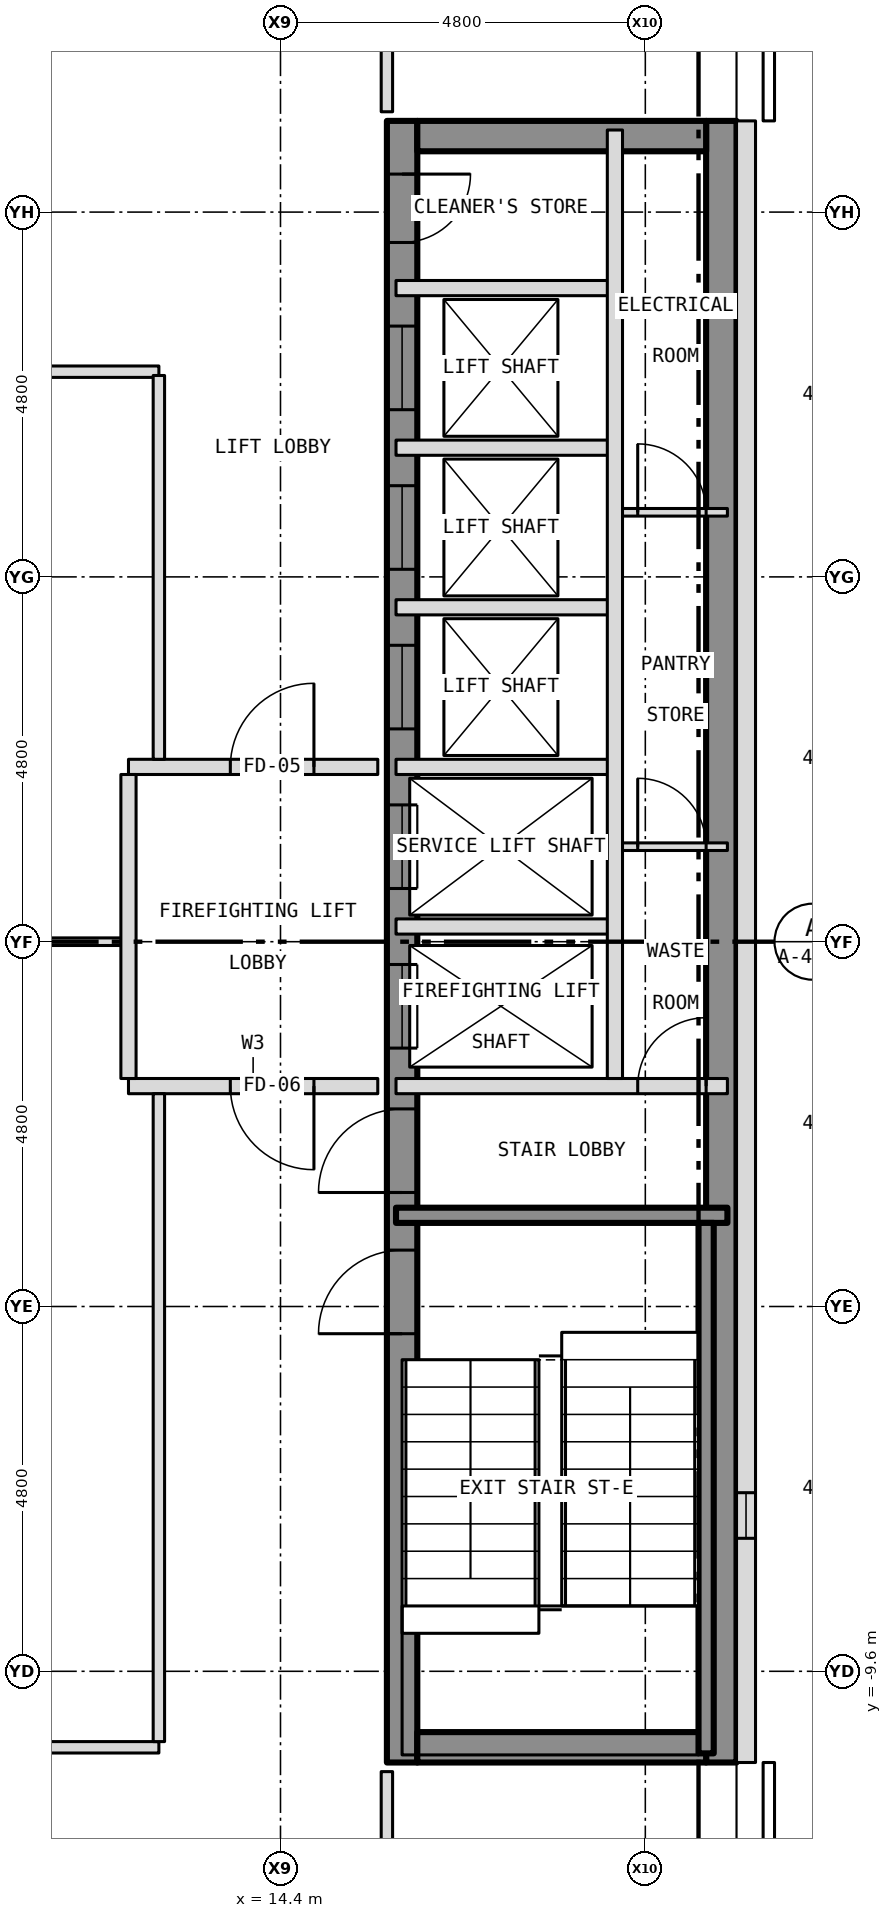
"""IFC4 building model, lengths in metres.
Left out: names, types, materials, properties, quantities, classifications, styles, units other than length and angle.
Written with IfcOpenShell. Run it as: python <this file> out.ifc"""

import sys

from ifc_helpers import new_model, si_unit, direction, frame, frame_2d, origin, place, context, subcontext, project, spatial, rectangle, extrude, element, fill, save


model = new_model("IFC4")
c1 = context("Model", 3, precision=1e-05, world=origin(), true_north=direction((0.0, 1.0)))
c2 = subcontext(c1, "Body", "Model", "MODEL_VIEW")
j1 = project(units=[si_unit("LENGTHUNIT", "METRE"), si_unit("PLANEANGLEUNIT", "RADIAN")], contexts=[c1])
p1 = place(None, origin())
s1 = spatial("IfcSite", under=j1, at=p1, CompositionType="ELEMENT")
p2 = place(p1, origin())
s2 = spatial("IfcBuilding", under=s1, at=p2, CompositionType="ELEMENT")
p3 = place(p2, frame((0.0, 0.0, 201.5)))
s3 = spatial("IfcBuildingStorey", under=s2, at=p3, CompositionType="ELEMENT", Elevation=201.5)
p4 = place(p3, frame((16.0, -10.8, 0.0), z_axis=(0.0, 0.0, 1.0), x_axis=(0.0, 1.0, 0.0)))
e1 = element("IfcWall", 1, at=p4, inside=s3, PredefinedType="SHEAR", context=c2, shape_type="SweptSolid", body=[
    extrude(rectangle(XDim=21.6, YDim=0.4, at=frame_2d((10.8, 0.0))), origin(), (0.0, 0.0, 1.0), 3.25),
])
p5 = place(p4, frame((9.4, 0.0, 0.0)))
e2 = element("IfcOpeningElement", 2, at=p5, cuts=e1, PredefinedType="OPENING", context=c2, shape_type="SweptSolid", body=[
    extrude(rectangle(XDim=1.1, YDim=2.1, at=frame_2d((0.55, 1.05))), frame((0.0, 0.212, 0.0), z_axis=(0.0, -1.0, 0.0), x_axis=(1.0, 0.0, 0.0)), (0.0, 0.0, 1.0), 0.424),
])
p6 = place(p4, frame((11.5, 0.0, 0.0)))
e3 = element("IfcOpeningElement", 3, at=p6, cuts=e1, PredefinedType="OPENING", context=c2, shape_type="SweptSolid", body=[
    extrude(rectangle(XDim=1.1, YDim=2.1, at=frame_2d((0.55, 1.05))), frame((0.0, 0.212, 0.0), z_axis=(0.0, -1.0, 0.0), x_axis=(1.0, 0.0, 0.0)), (0.0, 0.0, 1.0), 0.424),
])
p7 = place(p4, frame((13.6, 0.0, 0.0)))
e4 = element("IfcOpeningElement", 4, at=p7, cuts=e1, PredefinedType="OPENING", context=c2, shape_type="SweptSolid", body=[
    extrude(rectangle(XDim=1.1, YDim=2.1, at=frame_2d((0.55, 1.05))), frame((0.0, 0.212, 0.0), z_axis=(0.0, -1.0, 0.0), x_axis=(1.0, 0.0, 0.0)), (0.0, 0.0, 1.0), 0.424),
])
p8 = place(p4, frame((15.7, 0.0, 0.0)))
e5 = element("IfcOpeningElement", 5, at=p8, cuts=e1, PredefinedType="OPENING", context=c2, shape_type="SweptSolid", body=[
    extrude(rectangle(XDim=1.1, YDim=2.1, at=frame_2d((0.55, 1.05))), frame((0.0, 0.212, 0.0), z_axis=(0.0, -1.0, 0.0), x_axis=(1.0, 0.0, 0.0)), (0.0, 0.0, 1.0), 0.424),
])
p9 = place(p4, frame((17.8, 0.0, 0.0)))
e6 = element("IfcOpeningElement", 6, at=p9, cuts=e1, PredefinedType="OPENING", context=c2, shape_type="SweptSolid", body=[
    extrude(rectangle(XDim=1.1, YDim=2.1, at=frame_2d((0.55, 1.05))), frame((0.0, 0.212, 0.0), z_axis=(0.0, -1.0, 0.0), x_axis=(1.0, 0.0, 0.0)), (0.0, 0.0, 1.0), 0.424),
])
p10 = place(p4, frame((5.642, 0.0, 0.0)))
e7 = element("IfcOpeningElement", 7, at=p10, cuts=e1, PredefinedType="OPENING", context=c2, shape_type="SweptSolid", body=[
    extrude(rectangle(XDim=1.1, YDim=2.1, at=frame_2d((0.55, 1.05))), frame((0.0, 0.212, 0.0), z_axis=(0.0, -1.0, 0.0), x_axis=(1.0, 0.0, 0.0)), (0.0, 0.0, 1.0), 0.424),
])
p11 = place(p4, frame((7.5, 0.0, 0.0)))
e8 = element("IfcOpeningElement", 8, at=p11, cuts=e1, PredefinedType="OPENING", context=c2, shape_type="SweptSolid", body=[
    extrude(rectangle(XDim=1.1, YDim=2.1, at=frame_2d((0.55, 1.05))), frame((0.0, 0.212, 0.0), z_axis=(0.0, -1.0, 0.0), x_axis=(1.0, 0.0, 0.0)), (0.0, 0.0, 1.0), 0.424),
])
p12 = place(p4, frame((20.0, 0.0, 0.0)))
e9 = element("IfcOpeningElement", 9, at=p12, cuts=e1, PredefinedType="OPENING", context=c2, shape_type="SweptSolid", body=[
    extrude(rectangle(XDim=0.9, YDim=2.1, at=frame_2d((0.45, 1.05))), frame((0.0, 0.212, 0.0), z_axis=(0.0, -1.0, 0.0), x_axis=(1.0, 0.0, 0.0)), (0.0, 0.0, 1.0), 0.424),
])
p13 = place(p3, frame((20.2, -10.8, 0.0), z_axis=(0.0, 0.0, 1.0), x_axis=(0.0, 1.0, 0.0)))
e10 = element("IfcWall", 10, at=p13, inside=s3, PredefinedType="SHEAR", context=c2, shape_type="SweptSolid", body=[
    extrude(rectangle(XDim=21.6, YDim=0.4, at=frame_2d((10.8, 0.0))), origin(), (0.0, 0.0, 1.0), 3.25),
])
for number, where, z_axis, x_axis in (
    (11, (16.2, 10.6, 0.0), (0.0, 0.0, 1.0), (1.0, 0.0, 0.0)),
    (12, (16.2, -10.6, 0.0), (0.0, 0.0, 1.0), (1.0, 0.0, 0.0)),
):
    element("IfcWall", number, at=place(p3, frame(where, z_axis=z_axis, x_axis=x_axis)), inside=s3, PredefinedType="SHEAR", context=c2, shape_type="SweptSolid", body=[
        extrude(rectangle(XDim=3.8, YDim=0.4, at=frame_2d((1.9, 0.0))), origin(), (0.0, 0.0, 1.0), 3.25),
    ])
p14 = place(p3, frame((20.525, -10.8, 0.0), z_axis=(0.0, 0.0, 1.0), x_axis=(0.0, 1.0, 0.0)))
e13 = element("IfcWall", 13, at=p14, inside=s3, PredefinedType="SOLIDWALL", context=c2, shape_type="SweptSolid", body=[
    extrude(rectangle(XDim=21.6, YDim=0.25, at=frame_2d((10.8, 0.0))), origin(), (0.0, 0.0, 1.0), 3.5),
])
p15 = place(p14, frame((2.95, 0.0, 1.0)))
e14 = element("IfcOpeningElement", 14, at=p15, cuts=e13, PredefinedType="OPENING", context=c2, shape_type="SweptSolid", body=[
    extrude(rectangle(XDim=0.6, YDim=1.5, at=frame_2d((0.3, 0.75))), frame((0.0, 0.137, 0.0), z_axis=(0.0, -1.0, 0.0), x_axis=(1.0, 0.0, 0.0)), (0.0, 0.0, 1.0), 0.274),
])
p16 = place(p3, frame((6.3, -10.6, 0.0), z_axis=(0.0, 0.0, 1.0), x_axis=(1.0, 0.0, 0.0)))
e15 = element("IfcWall", 15, at=p16, inside=s3, PredefinedType="PARTITIONING", context=c2, shape_type="SweptSolid", body=[
    extrude(rectangle(XDim=6.5, YDim=0.15, at=frame_2d((3.25, 0.0))), origin(), (0.0, 0.0, 1.0), 3.35),
])
p17 = place(p3, frame((15.92, -3.6, 0.0), z_axis=(0.0, 0.0, 1.0), x_axis=(1.0, 0.0, 0.0)))
e16 = element("IfcWall", 16, at=p17, inside=s3, PredefinedType="SHEAR", context=c2, shape_type="SweptSolid", body=[
    extrude(rectangle(XDim=4.36, YDim=0.2, at=frame_2d((2.18, 0.0))), origin(), (0.0, 0.0, 1.0), 3.25),
])
p18 = place(p3, frame((12.4, -1.9, 0.0), z_axis=(0.0, 0.0, 1.0), x_axis=(1.0, 0.0, 0.0)))
e17 = element("IfcWall", 17, at=p18, inside=s3, PredefinedType="PARTITIONING", context=c2, shape_type="SweptSolid", body=[
    extrude(rectangle(XDim=3.28, YDim=0.2, at=frame_2d((1.64, 0.0))), origin(), (0.0, 0.0, 1.0), 3.35),
])
p19 = place(p18, frame((1.34, 0.0, 0.0)))
e18 = element("IfcOpeningElement", 18, at=p19, cuts=e17, PredefinedType="OPENING", context=c2, shape_type="SweptSolid", body=[
    extrude(rectangle(XDim=1.1, YDim=2.1, at=frame_2d((0.55, 1.05))), frame((0.0, 0.112, 0.0), z_axis=(0.0, -1.0, 0.0), x_axis=(1.0, 0.0, 0.0)), (0.0, 0.0, 1.0), 0.224),
])
p20 = place(p3, frame((15.92, -1.9, 0.0), z_axis=(0.0, 0.0, 1.0), x_axis=(1.0, 0.0, 0.0)))
e19 = element("IfcWall", 19, at=p20, inside=s3, PredefinedType="PARTITIONING", context=c2, shape_type="SweptSolid", body=[
    extrude(rectangle(XDim=4.36, YDim=0.2, at=frame_2d((2.18, 0.0))), origin(), (0.0, 0.0, 1.0), 3.25),
])
p21 = place(p20, frame((3.18, 0.0, 0.0)))
e20 = element("IfcOpeningElement", 20, at=p21, cuts=e19, PredefinedType="OPENING", context=c2, shape_type="SweptSolid", body=[
    extrude(rectangle(XDim=0.9, YDim=2.1, at=frame_2d((0.45, 1.05))), frame((0.0, 0.112, 0.0), z_axis=(0.0, -1.0, 0.0), x_axis=(1.0, 0.0, 0.0)), (0.0, 0.0, 1.0), 0.224),
])
p22 = place(p3, frame((9.787, 0.0, 0.0), z_axis=(0.0, 0.0, 1.0), x_axis=(1.0, 0.0, 0.0)))
e21 = element("IfcWall", 21, at=p22, inside=s3, PredefinedType="PARTITIONING", context=c2, shape_type="SweptSolid", body=[
    extrude(rectangle(XDim=2.613, YDim=0.1, at=frame_2d((1.306, 0.0))), origin(), (0.0, 0.0, 1.0), 2.728),
])
p23 = place(p3, frame((15.92, 0.2, 0.0), z_axis=(0.0, 0.0, 1.0), x_axis=(1.0, 0.0, 0.0)))
e22 = element("IfcWall", 22, at=p23, inside=s3, PredefinedType="PARTITIONING", context=c2, shape_type="SweptSolid", body=[
    extrude(rectangle(XDim=2.88, YDim=0.2, at=frame_2d((1.44, 0.0))), origin(), (0.0, 0.0, 1.0), 3.25),
])
p24 = place(p3, frame((18.8, 1.25, 0.0), z_axis=(0.0, 0.0, 1.0), x_axis=(1.0, 0.0, 0.0)))
e23 = element("IfcWall", 23, at=p24, inside=s3, PredefinedType="PARTITIONING", context=c2, shape_type="SweptSolid", body=[
    extrude(rectangle(XDim=1.48, YDim=0.1, at=frame_2d((0.74, 0.0))), origin(), (0.0, 0.0, 1.0), 3.25),
])
p25 = place(p24, frame((0.3, 0.0, 0.0)))
e24 = element("IfcOpeningElement", 24, at=p25, cuts=e23, PredefinedType="OPENING", context=c2, shape_type="SweptSolid", body=[
    extrude(rectangle(XDim=0.9, YDim=2.1, at=frame_2d((0.45, 1.05))), frame((0.0, 0.062, 0.0), z_axis=(0.0, -1.0, 0.0), x_axis=(1.0, 0.0, 0.0)), (0.0, 0.0, 1.0), 0.124),
])
p26 = place(p3, frame((12.4, 2.3, 0.0), z_axis=(0.0, 0.0, 1.0), x_axis=(1.0, 0.0, 0.0)))
e25 = element("IfcWall", 25, at=p26, inside=s3, PredefinedType="PARTITIONING", context=c2, shape_type="SweptSolid", body=[
    extrude(rectangle(XDim=3.28, YDim=0.2, at=frame_2d((1.64, 0.0))), origin(), (0.0, 0.0, 1.0), 3.35),
])
p27 = place(p26, frame((1.34, 0.0, 0.0)))
e26 = element("IfcOpeningElement", 26, at=p27, cuts=e25, PredefinedType="OPENING", context=c2, shape_type="SweptSolid", body=[
    extrude(rectangle(XDim=1.1, YDim=2.1, at=frame_2d((0.55, 1.05))), frame((0.0, 0.112, 0.0), z_axis=(0.0, -1.0, 0.0), x_axis=(1.0, 0.0, 0.0)), (0.0, 0.0, 1.0), 0.224),
])
for number, where, z_axis, x_axis in (
    (27, (15.92, 2.3, 0.0), (0.0, 0.0, 1.0), (1.0, 0.0, 0.0)),
    (28, (15.92, 4.4, 0.0), (0.0, 0.0, 1.0), (1.0, 0.0, 0.0)),
):
    element("IfcWall", number, at=place(p3, frame(where, z_axis=z_axis, x_axis=x_axis)), inside=s3, PredefinedType="PARTITIONING", context=c2, shape_type="SweptSolid", body=[
        extrude(rectangle(XDim=2.88, YDim=0.2, at=frame_2d((1.44, 0.0))), origin(), (0.0, 0.0, 1.0), 3.25),
    ])
p28 = place(p3, frame((18.8, 5.65, 0.0), z_axis=(0.0, 0.0, 1.0), x_axis=(1.0, 0.0, 0.0)))
e29 = element("IfcWall", 29, at=p28, inside=s3, PredefinedType="PARTITIONING", context=c2, shape_type="SweptSolid", body=[
    extrude(rectangle(XDim=1.48, YDim=0.1, at=frame_2d((0.74, 0.0))), origin(), (0.0, 0.0, 1.0), 3.25),
])
p29 = place(p28, frame((0.3, 0.0, 0.0)))
e30 = element("IfcOpeningElement", 30, at=p29, cuts=e29, PredefinedType="OPENING", context=c2, shape_type="SweptSolid", body=[
    extrude(rectangle(XDim=0.9, YDim=2.1, at=frame_2d((0.45, 1.05))), frame((0.0, 0.062, 0.0), z_axis=(0.0, -1.0, 0.0), x_axis=(1.0, 0.0, 0.0)), (0.0, 0.0, 1.0), 0.124),
])
p30 = place(p3, frame((15.92, 6.5, 0.0), z_axis=(0.0, 0.0, 1.0), x_axis=(1.0, 0.0, 0.0)))
e31 = element("IfcWall", 31, at=p30, inside=s3, PredefinedType="PARTITIONING", context=c2, shape_type="SweptSolid", body=[
    extrude(rectangle(XDim=2.88, YDim=0.2, at=frame_2d((1.44, 0.0))), origin(), (0.0, 0.0, 1.0), 3.25),
])
p31 = place(p3, frame((6.3, 7.5, 0.0), z_axis=(0.0, 0.0, 1.0), x_axis=(1.0, 0.0, 0.0)))
e32 = element("IfcWall", 32, at=p31, inside=s3, PredefinedType="PARTITIONING", context=c2, shape_type="SweptSolid", body=[
    extrude(rectangle(XDim=6.5, YDim=0.15, at=frame_2d((3.25, 0.0))), origin(), (0.0, 0.0, 1.0), 3.35),
])
p32 = place(p3, frame((15.92, 8.6, 0.0), z_axis=(0.0, 0.0, 1.0), x_axis=(1.0, 0.0, 0.0)))
e33 = element("IfcWall", 33, at=p32, inside=s3, PredefinedType="PARTITIONING", context=c2, shape_type="SweptSolid", body=[
    extrude(rectangle(XDim=2.88, YDim=0.2, at=frame_2d((1.44, 0.0))), origin(), (0.0, 0.0, 1.0), 3.25),
])
p33 = place(p3, frame((12.4, -1.8, 0.0), z_axis=(0.0, 0.0, 1.0), x_axis=(0.0, 1.0, 0.0)))
e34 = element("IfcWall", 34, at=p33, inside=s3, PredefinedType="PARTITIONING", context=c2, shape_type="SweptSolid", body=[
    extrude(rectangle(XDim=4.0, YDim=0.2, at=frame_2d((2.0, 0.0))), origin(), (0.0, 0.0, 1.0), 3.35),
])
p34 = place(p3, frame((12.8, -10.525, 0.0), z_axis=(0.0, 0.0, 1.0), x_axis=(0.0, 1.0, 0.0)))
e35 = element("IfcWall", 35, at=p34, inside=s3, PredefinedType="PARTITIONING", context=c2, shape_type="SweptSolid", body=[
    extrude(rectangle(XDim=8.525, YDim=0.15, at=frame_2d((4.262, 0.0))), origin(), (0.0, 0.0, 1.0), 3.35),
])
p35 = place(p3, frame((12.8, 2.4, 0.0), z_axis=(0.0, 0.0, 1.0), x_axis=(0.0, 1.0, 0.0)))
e36 = element("IfcWall", 36, at=p35, inside=s3, PredefinedType="PARTITIONING", context=c2, shape_type="SweptSolid", body=[
    extrude(rectangle(XDim=5.05, YDim=0.15, at=frame_2d((2.525, 0.0))), origin(), (0.0, 0.0, 1.0), 3.35),
])
for number, where, z_axis, x_axis in (
    (37, (15.8, -12.725, 0.0), (0.0, 0.0, 1.0), (0.0, 1.0, 0.0)),
    (38, (15.8, 10.92, 0.0), (0.0, 0.0, 1.0), (0.0, 1.0, 0.0)),
):
    element("IfcWall", number, at=place(p3, frame(where, z_axis=z_axis, x_axis=x_axis)), inside=s3, PredefinedType="PARTITIONING", context=c2, shape_type="SweptSolid", body=[
        extrude(rectangle(XDim=1.805, YDim=0.15, at=frame_2d((0.903, 0.0))), origin(), (0.0, 0.0, 1.0), 3.35),
    ])
p36 = place(p3, frame((18.8, -1.8, 0.0), z_axis=(0.0, 0.0, 1.0), x_axis=(0.0, 1.0, 0.0)))
e39 = element("IfcWall", 39, at=p36, inside=s3, PredefinedType="PARTITIONING", context=c2, shape_type="SweptSolid", body=[
    extrude(rectangle(XDim=12.48, YDim=0.2, at=frame_2d((6.24, 0.0))), origin(), (0.0, 0.0, 1.0), 3.25),
])
p37 = place(p3, frame((20.0, -10.68, 0.0), z_axis=(0.0, 0.0, 1.0), x_axis=(0.0, 1.0, 0.0)))
e40 = element("IfcWall", 40, at=p37, inside=s3, PredefinedType="SHEAR", context=c2, shape_type="SweptSolid", body=[
    extrude(rectangle(XDim=6.98, YDim=0.2, at=frame_2d((3.49, 0.0))), origin(), (0.0, 0.0, 1.0), 3.25),
])
p38 = place(p15, origin())
e41 = element("IfcWindow", 41, at=p38, inside=s3, PartitioningType="SINGLE_PANEL", PredefinedType="WINDOW", context=c2, shape_type="SweptSolid", body=[
    extrude(rectangle(XDim=0.6, YDim=1.5, at=frame_2d((0.3, 0.75))), frame((0.0, -0.035, 0.0), z_axis=(0.0, -1.0, 0.0), x_axis=(1.0, 0.0, 0.0)), (0.0, 0.0, 1.0), 0.06),
])
fill(e14, e41)
p39 = place(p5, origin())
e42 = element("IfcDoor", 42, at=p39, inside=s3, OperationType="SLIDING_TO_LEFT", PredefinedType="DOOR", context=c2, shape_type="SweptSolid", body=[
    extrude(rectangle(XDim=1.1, YDim=2.1, at=frame_2d((0.55, 1.05))), frame((0.0, 0.025, 0.0), z_axis=(0.0, -1.0, 0.0), x_axis=(1.0, 0.0, 0.0)), (0.0, 0.0, 1.0), 0.05),
])
fill(e2, e42)
p40 = place(p6, origin())
e43 = element("IfcDoor", 43, at=p40, inside=s3, OperationType="SLIDING_TO_LEFT", PredefinedType="DOOR", context=c2, shape_type="SweptSolid", body=[
    extrude(rectangle(XDim=1.1, YDim=2.1, at=frame_2d((0.55, 1.05))), frame((0.0, 0.025, 0.0), z_axis=(0.0, -1.0, 0.0), x_axis=(1.0, 0.0, 0.0)), (0.0, 0.0, 1.0), 0.05),
])
fill(e3, e43)
p41 = place(p7, origin())
e44 = element("IfcDoor", 44, at=p41, inside=s3, OperationType="SLIDING_TO_LEFT", PredefinedType="DOOR", context=c2, shape_type="SweptSolid", body=[
    extrude(rectangle(XDim=1.1, YDim=2.1, at=frame_2d((0.55, 1.05))), frame((0.0, 0.025, 0.0), z_axis=(0.0, -1.0, 0.0), x_axis=(1.0, 0.0, 0.0)), (0.0, 0.0, 1.0), 0.05),
])
fill(e4, e44)
p42 = place(p8, origin())
e45 = element("IfcDoor", 45, at=p42, inside=s3, OperationType="SLIDING_TO_LEFT", PredefinedType="DOOR", context=c2, shape_type="SweptSolid", body=[
    extrude(rectangle(XDim=1.1, YDim=2.1, at=frame_2d((0.55, 1.05))), frame((0.0, 0.025, 0.0), z_axis=(0.0, -1.0, 0.0), x_axis=(1.0, 0.0, 0.0)), (0.0, 0.0, 1.0), 0.05),
])
fill(e5, e45)
p43 = place(p9, origin())
e46 = element("IfcDoor", 46, at=p43, inside=s3, OperationType="SLIDING_TO_LEFT", PredefinedType="DOOR", context=c2, shape_type="SweptSolid", body=[
    extrude(rectangle(XDim=1.1, YDim=2.1, at=frame_2d((0.55, 1.05))), frame((0.0, 0.025, 0.0), z_axis=(0.0, -1.0, 0.0), x_axis=(1.0, 0.0, 0.0)), (0.0, 0.0, 1.0), 0.05),
])
fill(e6, e46)
p44 = place(p10, origin())
e47 = element("IfcDoor", 47, at=p44, inside=s3, OperationType="SINGLE_SWING_LEFT", PredefinedType="DOOR", context=c2, shape_type="SweptSolid", body=[
    extrude(rectangle(XDim=1.1, YDim=2.1, at=frame_2d((0.55, 1.05))), frame((0.0, 0.025, 0.0), z_axis=(0.0, -1.0, 0.0), x_axis=(1.0, 0.0, 0.0)), (0.0, 0.0, 1.0), 0.05),
])
fill(e7, e47)
p45 = place(p11, origin())
e48 = element("IfcDoor", 48, at=p45, inside=s3, OperationType="SINGLE_SWING_LEFT", PredefinedType="DOOR", context=c2, shape_type="SweptSolid", body=[
    extrude(rectangle(XDim=1.1, YDim=2.1, at=frame_2d((0.55, 1.05))), frame((0.0, 0.025, 0.0), z_axis=(0.0, -1.0, 0.0), x_axis=(1.0, 0.0, 0.0)), (0.0, 0.0, 1.0), 0.05),
])
fill(e8, e48)
p46 = place(p12, origin())
e49 = element("IfcDoor", 49, at=p46, inside=s3, OperationType="SINGLE_SWING_RIGHT", PredefinedType="DOOR", context=c2, shape_type="SweptSolid", body=[
    extrude(rectangle(XDim=0.9, YDim=2.1, at=frame_2d((0.45, 1.05))), frame((0.0, 0.025, 0.0), z_axis=(0.0, -1.0, 0.0), x_axis=(1.0, 0.0, 0.0)), (0.0, 0.0, 1.0), 0.05),
])
fill(e9, e49)
p47 = place(p21, origin())
e50 = element("IfcDoor", 50, at=p47, inside=s3, OperationType="SINGLE_SWING_RIGHT", PredefinedType="DOOR", context=c2, shape_type="SweptSolid", body=[
    extrude(rectangle(XDim=0.9, YDim=2.1, at=frame_2d((0.45, 1.05))), frame((0.0, 0.025, 0.0), z_axis=(0.0, -1.0, 0.0), x_axis=(1.0, 0.0, 0.0)), (0.0, 0.0, 1.0), 0.05),
])
fill(e20, e50)
p48 = place(p25, origin())
e51 = element("IfcDoor", 51, at=p48, inside=s3, OperationType="SINGLE_SWING_LEFT", PredefinedType="DOOR", context=c2, shape_type="SweptSolid", body=[
    extrude(rectangle(XDim=0.9, YDim=2.1, at=frame_2d((0.45, 1.05))), frame((0.0, 0.025, 0.0), z_axis=(0.0, -1.0, 0.0), x_axis=(1.0, 0.0, 0.0)), (0.0, 0.0, 1.0), 0.05),
])
fill(e24, e51)
p49 = place(p29, origin())
e52 = element("IfcDoor", 52, at=p49, inside=s3, OperationType="SINGLE_SWING_LEFT", PredefinedType="DOOR", context=c2, shape_type="SweptSolid", body=[
    extrude(rectangle(XDim=0.9, YDim=2.1, at=frame_2d((0.45, 1.05))), frame((0.0, 0.025, 0.0), z_axis=(0.0, -1.0, 0.0), x_axis=(1.0, 0.0, 0.0)), (0.0, 0.0, 1.0), 0.05),
])
fill(e30, e52)
p50 = place(p27, origin())
e53 = element("IfcDoor", 53, at=p50, inside=s3, OperationType="SINGLE_SWING_RIGHT", PredefinedType="DOOR", context=c2, shape_type="SweptSolid", body=[
    extrude(rectangle(XDim=1.1, YDim=2.1, at=frame_2d((0.55, 1.05))), frame((0.0, 0.025, 0.0), z_axis=(0.0, -1.0, 0.0), x_axis=(1.0, 0.0, 0.0)), (0.0, 0.0, 1.0), 0.05),
])
fill(e26, e53)
p51 = place(p19, origin())
e54 = element("IfcDoor", 54, at=p51, inside=s3, OperationType="SINGLE_SWING_RIGHT", PredefinedType="DOOR", context=c2, shape_type="SweptSolid", body=[
    extrude(rectangle(XDim=1.1, YDim=2.1, at=frame_2d((0.55, 1.05))), frame((0.0, 0.025, 0.0), z_axis=(0.0, -1.0, 0.0), x_axis=(1.0, 0.0, 0.0)), (0.0, 0.0, 1.0), 0.05),
])
fill(e18, e54)
save(model, sys.argv[1])
